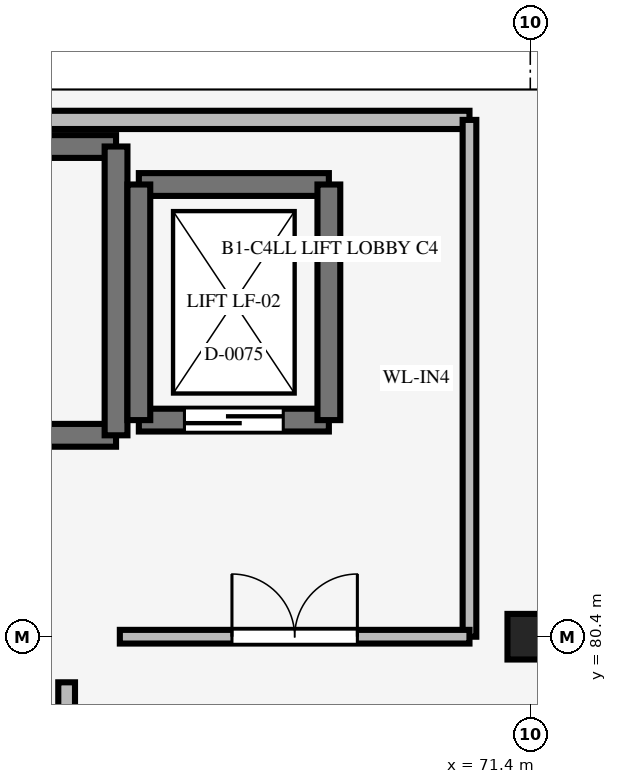
"""IFC4 building model, lengths in metres.
Left out: names, types, materials, properties, quantities, classifications, styles, units other than length and angle.
Written with IfcOpenShell. Run it as: python <this file> out.ifc"""

import sys

from ifc_helpers import new_model, si_unit, direction, frame, frame_2d, origin, origin_2d, place, context, subcontext, project, spatial, rectangle, extrude, element, fill, save


model = new_model("IFC4")
c1 = context("Model", 3, precision=1e-05, world=origin(), true_north=direction((0.0, 1.0)))
c2 = subcontext(c1, "Body", "Model", "MODEL_VIEW")
j1 = project(units=[si_unit("LENGTHUNIT", "METRE"), si_unit("PLANEANGLEUNIT", "RADIAN")], contexts=[c1])
p1 = place(None, origin())
s1 = spatial("IfcSite", under=j1, at=p1, CompositionType="ELEMENT")
p2 = place(p1, origin())
s2 = spatial("IfcBuilding", under=s1, at=p2, CompositionType="ELEMENT")
p3 = place(p2, frame((0.0, 0.0, -4.8)))
s3 = spatial("IfcBuildingStorey", under=s2, at=p3, CompositionType="ELEMENT", Elevation=-4.8)
p4 = place(p3, frame((71.4, 80.4, 0.0), z_axis=(0.0, 0.0, 1.0), x_axis=(1.0, 0.0, 0.0)))
e1 = element("IfcColumn", 1, at=p4, inside=s3, PredefinedType="COLUMN", context=c2, shape_type="SweptSolid", body=[
    extrude(rectangle(XDim=0.6, YDim=0.6, at=origin_2d()), origin(), (0.0, 0.0, 1.0), 4.8),
])
for number, where, z_axis, x_axis in (
    (2, (65.95, 83.05, 0.0), (0.0, 0.0, 1.0), (-1.0, 0.0, 0.0)),
    (3, (56.45, 86.85, 0.0), (0.0, 0.0, 1.0), (1.0, 0.0, 0.0)),
):
    element("IfcWall", number, at=place(p3, frame(where, z_axis=z_axis, x_axis=x_axis)), inside=s3, PredefinedType="SHEAR", context=c2, shape_type="SweptSolid", body=[
        extrude(rectangle(XDim=9.5, YDim=0.3, at=frame_2d((4.75, 0.0))), origin(), (0.0, 0.0, 1.0), 4.8),
    ])
p5 = place(p3, frame((65.95, 83.05, 0.0), z_axis=(0.0, 0.0, 1.0), x_axis=(0.0, 1.0, 0.0)))
e4 = element("IfcWall", 4, at=p5, inside=s3, PredefinedType="SHEAR", context=c2, shape_type="SweptSolid", body=[
    extrude(rectangle(XDim=3.8, YDim=0.3, at=frame_2d((1.9, 0.0))), origin(), (0.0, 0.0, 1.0), 4.8),
])
p6 = place(p3, frame((66.25, 83.25, 0.0), z_axis=(0.0, 0.0, 1.0), x_axis=(1.0, 0.0, 0.0)))
e5 = element("IfcWall", 5, at=p6, inside=s3, PredefinedType="SHEAR", context=c2, shape_type="SweptSolid", body=[
    extrude(rectangle(XDim=2.5, YDim=0.3, at=frame_2d((1.25, 0.0))), origin(), (0.0, 0.0, 1.0), 4.48),
])
p7 = place(p6, frame((0.6, 0.0, 0.0)))
e6 = element("IfcOpeningElement", 6, at=p7, cuts=e5, PredefinedType="OPENING", context=c2, shape_type="SweptSolid", body=[
    extrude(rectangle(XDim=1.3, YDim=2.2, at=frame_2d((0.65, 1.1))), frame((0.0, 0.16, 0.0), z_axis=(0.0, -1.0, 0.0), x_axis=(1.0, 0.0, 0.0)), (0.0, 0.0, 1.0), 0.32),
])
p8 = place(p3, frame((66.25, 86.35, 0.0), z_axis=(0.0, 0.0, 1.0), x_axis=(1.0, 0.0, 0.0)))
e7 = element("IfcWall", 7, at=p8, inside=s3, PredefinedType="SHEAR", context=c2, shape_type="SweptSolid", body=[
    extrude(rectangle(XDim=2.5, YDim=0.3, at=frame_2d((1.25, 0.0))), origin(), (0.0, 0.0, 1.0), 4.48),
])
for number, where, z_axis, x_axis in (
    (8, (66.25, 83.25, 0.0), (0.0, 0.0, 1.0), (0.0, 1.0, 0.0)),
    (9, (68.75, 83.25, 0.0), (0.0, 0.0, 1.0), (0.0, 1.0, 0.0)),
):
    element("IfcWall", number, at=place(p3, frame(where, z_axis=z_axis, x_axis=x_axis)), inside=s3, PredefinedType="SHEAR", context=c2, shape_type="SweptSolid", body=[
        extrude(rectangle(XDim=3.1, YDim=0.3, at=frame_2d((1.55, 0.0))), origin(), (0.0, 0.0, 1.0), 4.48),
    ])
p9 = place(p3, frame((65.3, 58.2, 0.0), z_axis=(0.0, 0.0, 1.0), x_axis=(0.0, 1.0, 0.0)))
e10 = element("IfcWall", 10, at=p9, inside=s3, PredefinedType="STANDARD", context=c2, shape_type="SweptSolid", body=[
    extrude(rectangle(XDim=21.6, YDim=0.22, at=frame_2d((10.8, 0.0))), origin(), (0.0, 0.0, 1.0), 3.1),
])
p10 = place(p9, frame((11.71, 0.0, 0.0)))
e11 = element("IfcOpeningElement", 11, at=p10, cuts=e10, PredefinedType="OPENING", context=c2, shape_type="SweptSolid", body=[
    extrude(rectangle(XDim=0.98, YDim=2.15, at=frame_2d((0.49, 1.075))), frame((0.0, 0.12, 0.0), z_axis=(0.0, -1.0, 0.0), x_axis=(1.0, 0.0, 0.0)), (0.0, 0.0, 1.0), 0.24),
])
p11 = place(p3, frame((54.595, 87.2, 0.0), z_axis=(0.0, 0.0, 1.0), x_axis=(1.0, 0.0, 0.0)))
e12 = element("IfcWall", 12, at=p11, inside=s3, PredefinedType="STANDARD", context=c2, shape_type="SweptSolid", body=[
    extrude(rectangle(XDim=16.005, YDim=0.24, at=frame_2d((8.002, 0.0))), origin(), (0.0, 0.0, 1.0), 3.1),
])
p12 = place(p3, frame((70.6, 80.4, 0.0), z_axis=(0.0, 0.0, 1.0), x_axis=(0.0, 1.0, 0.0)))
e13 = element("IfcWall", 13, at=p12, inside=s3, PredefinedType="STANDARD", context=c2, shape_type="SweptSolid", body=[
    extrude(rectangle(XDim=6.8, YDim=0.18, at=frame_2d((3.4, 0.0))), origin(), (0.0, 0.0, 1.0), 3.1),
])
p13 = place(p3, frame((66.0, 80.4, 0.0), z_axis=(0.0, 0.0, 1.0), x_axis=(1.0, 0.0, 0.0)))
e14 = element("IfcWall", 14, at=p13, inside=s3, PredefinedType="STANDARD", context=c2, shape_type="SweptSolid", body=[
    extrude(rectangle(XDim=4.6, YDim=0.18, at=frame_2d((2.3, 0.0))), origin(), (0.0, 0.0, 1.0), 3.1),
])
p14 = place(p13, frame((1.475, 0.0, 0.0)))
e15 = element("IfcOpeningElement", 15, at=p14, cuts=e14, PredefinedType="OPENING", context=c2, shape_type="SweptSolid", body=[
    extrude(rectangle(XDim=1.65, YDim=2.2, at=frame_2d((0.825, 1.1))), frame((0.0, 0.1, 0.0), z_axis=(0.0, -1.0, 0.0), x_axis=(1.0, 0.0, 0.0)), (0.0, 0.0, 1.0), 0.2),
])
p15 = place(p7, origin())
e16 = element("IfcDoor", 16, at=p15, inside=s3, OperationType="DOUBLE_DOOR_SLIDING", PredefinedType="DOOR", context=c2, shape_type="SweptSolid", body=[
    extrude(rectangle(XDim=1.3, YDim=2.2, at=frame_2d((0.65, 1.1))), frame((0.0, 0.025, 0.0), z_axis=(0.0, -1.0, 0.0), x_axis=(1.0, 0.0, 0.0)), (0.0, 0.0, 1.0), 0.05),
])
fill(e6, e16)
p16 = place(p14, origin())
e17 = element("IfcDoor", 17, at=p16, inside=s3, OperationType="DOUBLE_DOOR_SINGLE_SWING", PredefinedType="DOOR", context=c2, shape_type="SweptSolid", body=[
    extrude(rectangle(XDim=1.65, YDim=2.2, at=frame_2d((0.825, 1.1))), frame((0.0, 0.025, 0.0), z_axis=(0.0, -1.0, 0.0), x_axis=(1.0, 0.0, 0.0)), (0.0, 0.0, 1.0), 0.05),
])
fill(e15, e17)
save(model, sys.argv[1])
